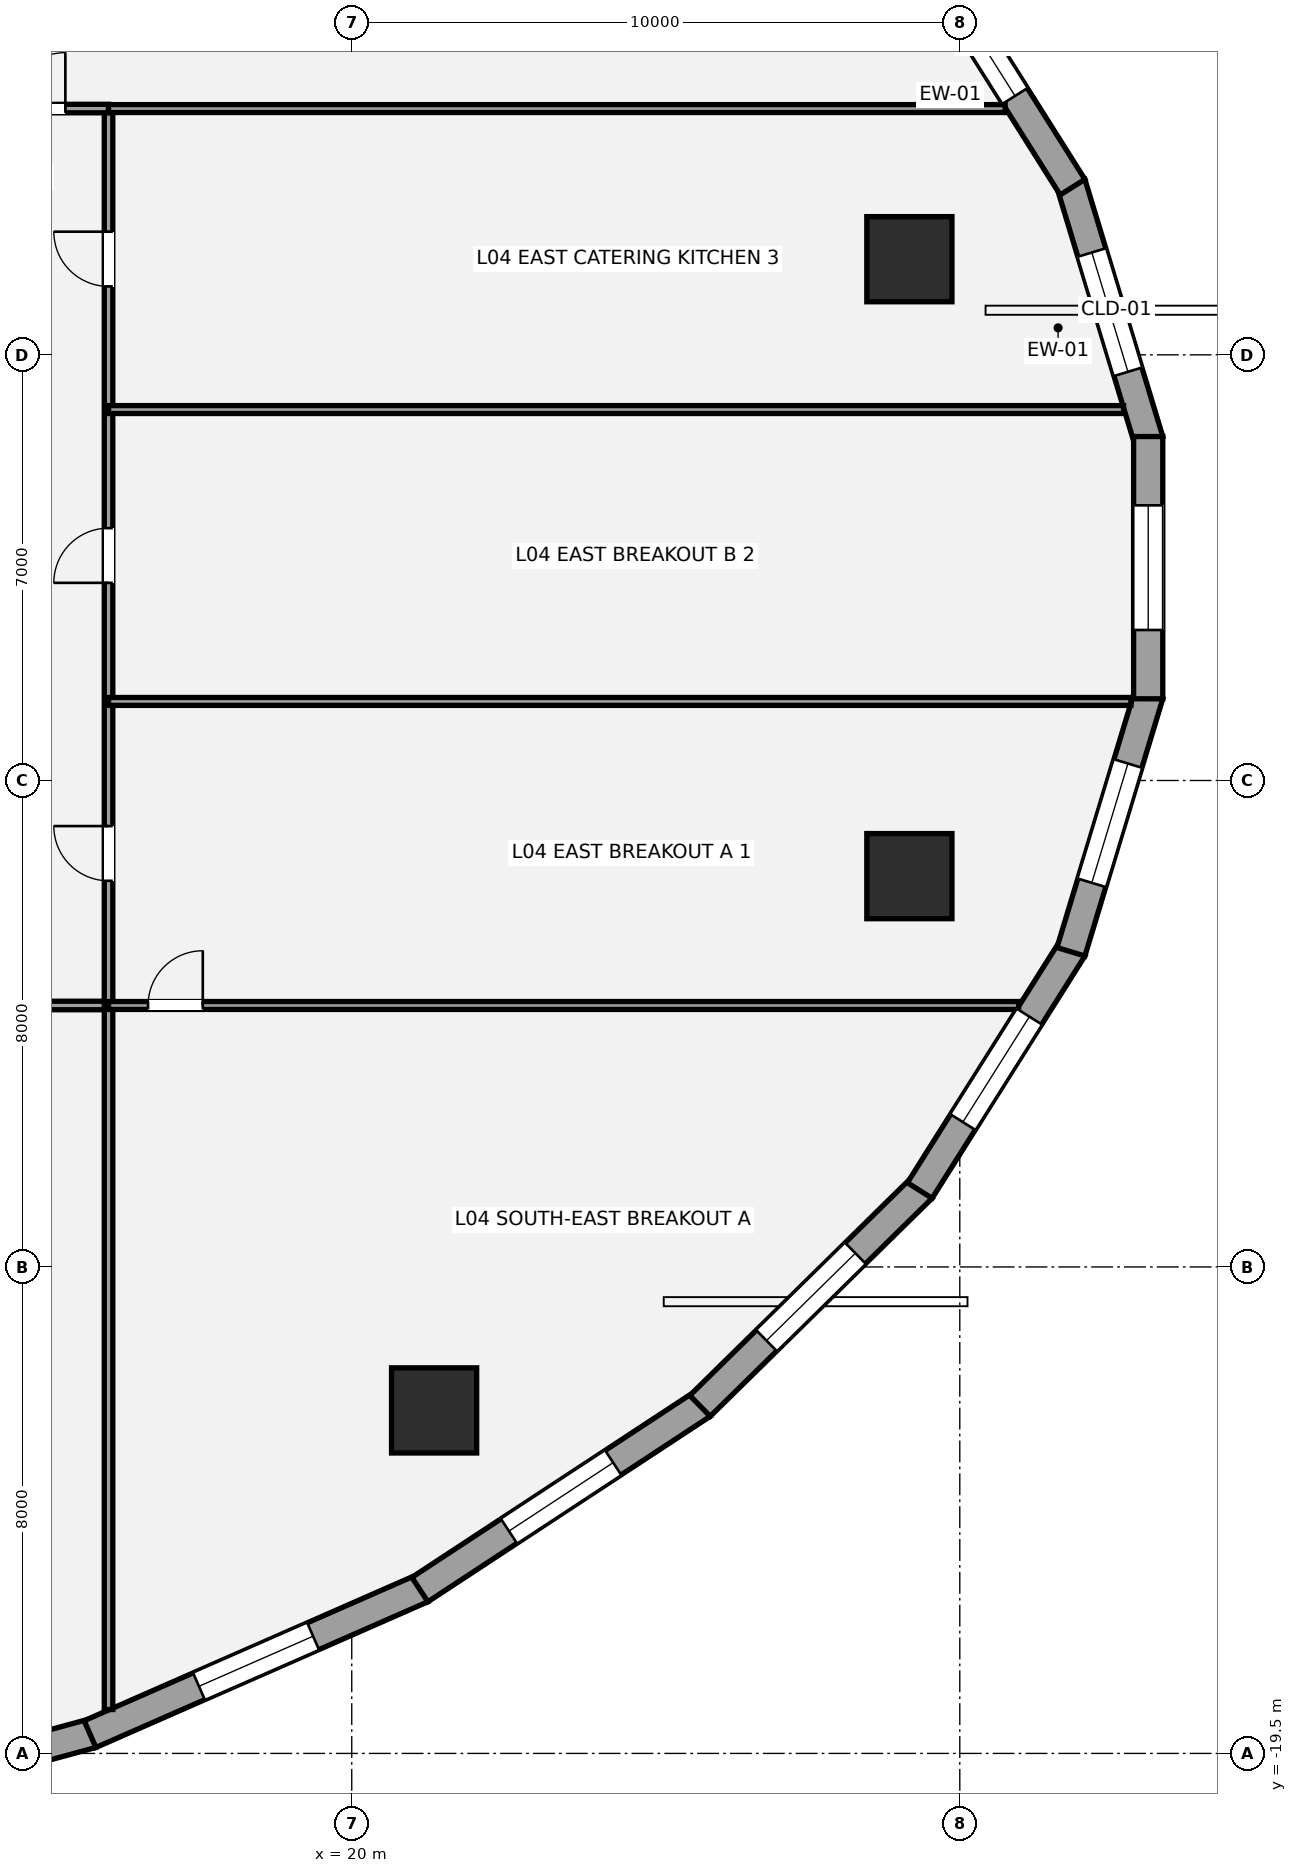
"""IFC4 building model, lengths in metres.
Left out: names, types, materials, properties, quantities, classifications, styles, units other than length and angle.
Written with IfcOpenShell. Run it as: python <this file> out.ifc"""

import sys

from ifc_helpers import new_model, si_unit, direction, frame, frame_2d, origin, origin_2d, place, context, subcontext, project, spatial, rectangle, hollow_circle, extrude, element, fill, save


model = new_model("IFC4")
c1 = context("Model", 3, precision=1e-05, world=origin(), true_north=direction((0.0, 1.0)))
c2 = subcontext(c1, "Body", "Model", "MODEL_VIEW")
j1 = project(units=[si_unit("LENGTHUNIT", "METRE"), si_unit("PLANEANGLEUNIT", "RADIAN")], contexts=[c1])
p1 = place(None, origin())
s1 = spatial("IfcSite", under=j1, at=p1, CompositionType="ELEMENT")
p2 = place(p1, origin())
s2 = spatial("IfcBuilding", under=s1, at=p2, CompositionType="ELEMENT")
p3 = place(p2, frame((0.0, 0.0, 18.6)))
s3 = spatial("IfcBuildingStorey", under=s2, at=p3, CompositionType="ELEMENT", Elevation=18.6)
for number, where, z_axis, x_axis in (
    (1, (29.171, 5.073, 0.0), (0.0, 0.0, 1.0), (1.0, 0.0, 0.0)),
    (2, (21.354, -13.859, 0.0), (0.0, 0.0, 1.0), (1.0, 0.0, 0.0)),
    (3, (29.171, -5.073, 0.0), (0.0, 0.0, 1.0), (1.0, 0.0, 0.0)),
):
    element("IfcColumn", number, at=place(p3, frame(where, z_axis=z_axis, x_axis=x_axis)), inside=s3, PredefinedType="USERDEFINED", context=c2, shape_type="SweptSolid", body=[
        extrude(hollow_circle(Radius=0.7, WallThickness=0.05, at=origin_2d()), origin(), (0.0, 0.0, 1.0), 4.2),
    ])
p4 = place(p3, frame((31.828, 6.317, 0.0), z_axis=(0.0, 0.0, 1.0), x_axis=(0.289855603468, -0.957070388811, 0.0)))
e4 = element("IfcWall", 4, at=p4, inside=s3, PredefinedType="STANDARD", context=c2, shape_type="SweptSolid", body=[
    extrude(rectangle(XDim=4.419, YDim=0.48, at=frame_2d((2.21, 0.0))), origin(), (0.0, 0.0, 1.0), 3.109),
])
p5 = place(p4, frame((1.185, 0.0, 0.72)))
e5 = element("IfcOpeningElement", 5, at=p5, cuts=e4, PredefinedType="OPENING", context=c2, shape_type="SweptSolid", body=[
    extrude(rectangle(XDim=2.05, YDim=1.8, at=frame_2d((1.025, 0.9))), frame((0.0, 0.25, 0.0), z_axis=(0.0, -1.0, 0.0), x_axis=(1.0, 0.0, 0.0)), (0.0, 0.0, 1.0), 0.5),
])
p6 = place(p3, frame((29.341, 10.243, 0.0), z_axis=(0.0, 0.0, 1.0), x_axis=(0.53349762721, -0.845801561693, 0.0)))
e6 = element("IfcWall", 6, at=p6, inside=s3, PredefinedType="STANDARD", context=c2, shape_type="SweptSolid", body=[
    extrude(rectangle(XDim=4.711, YDim=0.48, at=frame_2d((2.355, 0.0))), origin(), (0.0, 0.0, 1.0), 3.109),
])
p7 = place(p6, frame((0.888, 0.0, 0.72)))
e7 = element("IfcOpeningElement", 7, at=p7, cuts=e6, PredefinedType="OPENING", context=c2, shape_type="SweptSolid", body=[
    extrude(rectangle(XDim=2.05, YDim=1.8, at=frame_2d((1.025, 0.9))), frame((0.0, 0.25, 0.0), z_axis=(0.0, -1.0, 0.0), x_axis=(1.0, 0.0, 0.0)), (0.0, 0.0, 1.0), 0.5),
])
p8 = place(p3, frame((15.729, -19.171, 0.0), z_axis=(0.0, 0.0, 1.0), x_axis=(-0.964936550718, -0.262483243445, 0.0)))
e8 = element("IfcWall", 8, at=p8, inside=s3, PredefinedType="STANDARD", context=c2, shape_type="SweptSolid", body=[
    extrude(rectangle(XDim=6.288, YDim=0.48, at=frame_2d((3.144, 0.0))), origin(), (0.0, 0.0, 1.0), 3.109),
])
p9 = place(p8, frame((2.119, 0.0, 0.72)))
e9 = element("IfcOpeningElement", 9, at=p9, cuts=e8, PredefinedType="OPENING", context=c2, shape_type="SweptSolid", body=[
    extrude(rectangle(XDim=2.05, YDim=1.8, at=frame_2d((1.025, 0.9))), frame((0.0, 0.25, 0.0), z_axis=(0.0, -1.0, 0.0), x_axis=(1.0, 0.0, 0.0)), (0.0, 0.0, 1.0), 0.5),
])
p10 = place(p3, frame((21.156, -16.786, 0.0), z_axis=(0.0, 0.0, 1.0), x_axis=(-0.91570760638, -0.401845218484, 0.0)))
e10 = element("IfcWall", 10, at=p10, inside=s3, PredefinedType="STANDARD", context=c2, shape_type="SweptSolid", body=[
    extrude(rectangle(XDim=5.963, YDim=0.48, at=frame_2d((2.981, 0.0))), origin(), (0.0, 0.0, 1.0), 3.109),
])
p11 = place(p10, frame((1.957, 0.0, 0.72)))
e11 = element("IfcOpeningElement", 11, at=p11, cuts=e10, PredefinedType="OPENING", context=c2, shape_type="SweptSolid", body=[
    extrude(rectangle(XDim=2.05, YDim=1.8, at=frame_2d((1.025, 0.9))), frame((0.0, 0.25, 0.0), z_axis=(0.0, -1.0, 0.0), x_axis=(1.0, 0.0, 0.0)), (0.0, 0.0, 1.0), 0.5),
])
p12 = place(p3, frame((25.764, -13.756, 0.0), z_axis=(0.0, 0.0, 1.0), x_axis=(-0.835863918172, -0.548936708827, 0.0)))
e12 = element("IfcWall", 12, at=p12, inside=s3, PredefinedType="STANDARD", context=c2, shape_type="SweptSolid", body=[
    extrude(rectangle(XDim=5.555, YDim=0.48, at=frame_2d((2.778, 0.0))), origin(), (0.0, 0.0, 1.0), 3.109),
])
p13 = place(p12, frame((1.753, 0.0, 0.72)))
e13 = element("IfcOpeningElement", 13, at=p13, cuts=e12, PredefinedType="OPENING", context=c2, shape_type="SweptSolid", body=[
    extrude(rectangle(XDim=2.05, YDim=1.8, at=frame_2d((1.025, 0.9))), frame((0.0, 0.25, 0.0), z_axis=(0.0, -1.0, 0.0), x_axis=(1.0, 0.0, 0.0)), (0.0, 0.0, 1.0), 0.5),
])
p14 = place(p3, frame((29.376, -10.199, 0.0), z_axis=(0.0, 0.0, 1.0), x_axis=(-0.713189080178, -0.700971708355, 0.0)))
e14 = element("IfcWall", 14, at=p14, inside=s3, PredefinedType="STANDARD", context=c2, shape_type="SweptSolid", body=[
    extrude(rectangle(XDim=5.116, YDim=0.48, at=frame_2d((2.558, 0.0))), origin(), (0.0, 0.0, 1.0), 3.109),
])
p15 = place(p14, frame((1.533, 0.0, 0.72)))
e15 = element("IfcOpeningElement", 15, at=p15, cuts=e14, PredefinedType="OPENING", context=c2, shape_type="SweptSolid", body=[
    extrude(rectangle(XDim=2.05, YDim=1.8, at=frame_2d((1.025, 0.9))), frame((0.0, 0.25, 0.0), z_axis=(0.0, -1.0, 0.0), x_axis=(1.0, 0.0, 0.0)), (0.0, 0.0, 1.0), 0.5),
])
p16 = place(p3, frame((31.854, -6.258, 0.0), z_axis=(0.0, 0.0, 1.0), x_axis=(-0.53349762721, -0.845801561693, 0.0)))
e16 = element("IfcWall", 16, at=p16, inside=s3, PredefinedType="STANDARD", context=c2, shape_type="SweptSolid", body=[
    extrude(rectangle(XDim=4.711, YDim=0.48, at=frame_2d((2.355, 0.0))), origin(), (0.0, 0.0, 1.0), 3.109),
])
p17 = place(p16, frame((1.33, 0.0, 0.72)))
e17 = element("IfcOpeningElement", 17, at=p17, cuts=e16, PredefinedType="OPENING", context=c2, shape_type="SweptSolid", body=[
    extrude(rectangle(XDim=2.05, YDim=1.8, at=frame_2d((1.025, 0.9))), frame((0.0, 0.25, 0.0), z_axis=(0.0, -1.0, 0.0), x_axis=(1.0, 0.0, 0.0)), (0.0, 0.0, 1.0), 0.5),
])
p18 = place(p3, frame((33.109, -2.087, 0.0), z_axis=(0.0, 0.0, 1.0), x_axis=(-0.289855603468, -0.957070388811, 0.0)))
e18 = element("IfcWall", 18, at=p18, inside=s3, PredefinedType="STANDARD", context=c2, shape_type="SweptSolid", body=[
    extrude(rectangle(XDim=4.419, YDim=0.48, at=frame_2d((2.21, 0.0))), origin(), (0.0, 0.0, 1.0), 3.109),
])
p19 = place(p18, frame((1.185, 0.0, 0.72)))
e19 = element("IfcOpeningElement", 19, at=p19, cuts=e18, PredefinedType="OPENING", context=c2, shape_type="SweptSolid", body=[
    extrude(rectangle(XDim=2.05, YDim=1.8, at=frame_2d((1.025, 0.9))), frame((0.0, 0.25, 0.0), z_axis=(0.0, -1.0, 0.0), x_axis=(1.0, 0.0, 0.0)), (0.0, 0.0, 1.0), 0.5),
])
p20 = place(p3, frame((33.099, 2.156, 0.0), z_axis=(0.0, 0.0, 1.0), x_axis=(0.0, -1.0, 0.0)))
e20 = element("IfcWall", 20, at=p20, inside=s3, PredefinedType="STANDARD", context=c2, shape_type="SweptSolid", body=[
    extrude(rectangle(XDim=4.313, YDim=0.48, at=frame_2d((2.156, 0.0))), origin(), (0.0, 0.0, 1.0), 3.109),
])
p21 = place(p20, frame((1.131, 0.0, 0.72)))
e21 = element("IfcOpeningElement", 21, at=p21, cuts=e20, PredefinedType="OPENING", context=c2, shape_type="SweptSolid", body=[
    extrude(rectangle(XDim=2.05, YDim=1.8, at=frame_2d((1.025, 0.9))), frame((0.0, 0.25, 0.0), z_axis=(0.0, -1.0, 0.0), x_axis=(1.0, 0.0, 0.0)), (0.0, 0.0, 1.0), 0.5),
])
p22 = place(p3, frame((-18.6, -7.2, 0.0), z_axis=(0.0, 0.0, 1.0), x_axis=(1.0, 0.0, 0.0)))
e22 = element("IfcWall", 22, at=p22, inside=s3, PredefinedType="PARTITIONING", context=c2, shape_type="SweptSolid", body=[
    extrude(rectangle(XDim=34.6, YDim=0.14, at=frame_2d((17.3, 0.0))), origin(), (0.0, 0.0, 1.0), 3.98),
])
p23 = place(p22, frame((3.6, 0.0, 0.0)))
e23 = element("IfcOpeningElement", 23, at=p23, cuts=e22, PredefinedType="OPENING", context=c2, shape_type="SweptSolid", body=[
    extrude(rectangle(XDim=0.9, YDim=2.1, at=frame_2d((0.45, 1.05))), frame((0.0, 0.08, 0.0), z_axis=(0.0, -1.0, 0.0), x_axis=(1.0, 0.0, 0.0)), (0.0, 0.0, 1.0), 0.16),
])
p24 = place(p22, frame((12.15, 0.0, 0.0)))
e24 = element("IfcOpeningElement", 24, at=p24, cuts=e22, PredefinedType="OPENING", context=c2, shape_type="SweptSolid", body=[
    extrude(rectangle(XDim=0.9, YDim=2.1, at=frame_2d((0.45, 1.05))), frame((0.0, 0.08, 0.0), z_axis=(0.0, -1.0, 0.0), x_axis=(1.0, 0.0, 0.0)), (0.0, 0.0, 1.0), 0.16),
])
p25 = place(p22, frame((20.8, 0.0, 0.0)))
e25 = element("IfcOpeningElement", 25, at=p25, cuts=e22, PredefinedType="OPENING", context=c2, shape_type="SweptSolid", body=[
    extrude(rectangle(XDim=0.9, YDim=2.1, at=frame_2d((0.45, 1.05))), frame((0.0, 0.08, 0.0), z_axis=(0.0, -1.0, 0.0), x_axis=(1.0, 0.0, 0.0)), (0.0, 0.0, 1.0), 0.16),
])
p26 = place(p22, frame((29.55, 0.0, 0.0)))
e26 = element("IfcOpeningElement", 26, at=p26, cuts=e22, PredefinedType="OPENING", context=c2, shape_type="SweptSolid", body=[
    extrude(rectangle(XDim=0.9, YDim=2.1, at=frame_2d((0.45, 1.05))), frame((0.0, 0.08, 0.0), z_axis=(0.0, -1.0, 0.0), x_axis=(1.0, 0.0, 0.0)), (0.0, 0.0, 1.0), 0.16),
])
p27 = place(p3, frame((16.0, -18.778, 0.0), z_axis=(0.0, 0.0, 1.0), x_axis=(0.0, 1.0, 0.0)))
e27 = element("IfcWall", 27, at=p27, inside=s3, PredefinedType="PARTITIONING", context=c2, shape_type="SweptSolid", body=[
    extrude(rectangle(XDim=26.328, YDim=0.14, at=frame_2d((13.164, 0.0))), origin(), (0.0, 0.0, 1.0), 3.348),
])
p28 = place(p27, frame((13.628, 0.0, 0.0)))
e28 = element("IfcOpeningElement", 28, at=p28, cuts=e27, PredefinedType="OPENING", context=c2, shape_type="SweptSolid", body=[
    extrude(rectangle(XDim=0.9, YDim=2.1, at=frame_2d((0.45, 1.05))), frame((0.0, 0.08, 0.0), z_axis=(0.0, -1.0, 0.0), x_axis=(1.0, 0.0, 0.0)), (0.0, 0.0, 1.0), 0.16),
])
p29 = place(p27, frame((18.528, 0.0, 0.0)))
e29 = element("IfcOpeningElement", 29, at=p29, cuts=e27, PredefinedType="OPENING", context=c2, shape_type="SweptSolid", body=[
    extrude(rectangle(XDim=0.9, YDim=2.1, at=frame_2d((0.45, 1.05))), frame((0.0, 0.08, 0.0), z_axis=(0.0, -1.0, 0.0), x_axis=(1.0, 0.0, 0.0)), (0.0, 0.0, 1.0), 0.16),
])
p30 = place(p27, frame((23.403, 0.0, 0.0)))
e30 = element("IfcOpeningElement", 30, at=p30, cuts=e27, PredefinedType="OPENING", context=c2, shape_type="SweptSolid", body=[
    extrude(rectangle(XDim=0.9, YDim=2.1, at=frame_2d((0.45, 1.05))), frame((0.0, 0.08, 0.0), z_axis=(0.0, -1.0, 0.0), x_axis=(1.0, 0.0, 0.0)), (0.0, 0.0, 1.0), 0.16),
])
p31 = place(p3, frame((14.05, 7.55, 0.0), z_axis=(0.0, 0.0, 1.0), x_axis=(1.0, 0.0, 0.0)))
e31 = element("IfcWall", 31, at=p31, inside=s3, PredefinedType="PARTITIONING", context=c2, shape_type="SweptSolid", body=[
    extrude(rectangle(XDim=1.95, YDim=0.14, at=frame_2d((0.975, 0.0))), origin(), (0.0, 0.0, 1.0), 3.433),
])
p32 = place(p31, frame((0.32, 0.0, 0.0)))
e32 = element("IfcOpeningElement", 32, at=p32, cuts=e31, PredefinedType="OPENING", context=c2, shape_type="SweptSolid", body=[
    extrude(rectangle(XDim=0.92, YDim=2.15, at=frame_2d((0.46, 1.075))), frame((0.0, 0.08, 0.0), z_axis=(0.0, -1.0, 0.0), x_axis=(1.0, 0.0, 0.0)), (0.0, 0.0, 1.0), 0.16),
])
p33 = place(p3, frame((16.0, 7.55, 0.0), z_axis=(0.0, 0.0, 1.0), x_axis=(1.0, 0.0, 0.0)))
e33 = element("IfcWall", 33, at=p33, inside=s3, PredefinedType="PARTITIONING", context=c2, shape_type="SweptSolid", body=[
    extrude(rectangle(XDim=14.747, YDim=0.13, at=frame_2d((7.373, 0.0))), origin(), (0.0, 0.0, 1.0), 2.958),
])
p34 = place(p3, frame((16.0, -7.2, 0.0), z_axis=(0.0, 0.0, 1.0), x_axis=(1.0, 0.0, 0.0)))
e34 = element("IfcWall", 34, at=p34, inside=s3, PredefinedType="PARTITIONING", context=c2, shape_type="SweptSolid", body=[
    extrude(rectangle(XDim=14.967, YDim=0.13, at=frame_2d((7.484, 0.0))), origin(), (0.0, 0.0, 1.0), 2.958),
])
p35 = place(p34, frame((0.65, 0.0, 0.0)))
e35 = element("IfcOpeningElement", 35, at=p35, cuts=e34, PredefinedType="OPENING", context=c2, shape_type="SweptSolid", body=[
    extrude(rectangle(XDim=0.9, YDim=2.1, at=frame_2d((0.45, 1.05))), frame((0.0, 0.075, 0.0), z_axis=(0.0, -1.0, 0.0), x_axis=(1.0, 0.0, 0.0)), (0.0, 0.0, 1.0), 0.15),
])
p36 = place(p3, frame((16.0, -2.2, 0.0), z_axis=(0.0, 0.0, 1.0), x_axis=(1.0, 0.0, 0.0)))
e36 = element("IfcWall", 36, at=p36, inside=s3, PredefinedType="PARTITIONING", context=c2, shape_type="SweptSolid", body=[
    extrude(rectangle(XDim=16.816, YDim=0.13, at=frame_2d((8.408, 0.0))), origin(), (0.0, 0.0, 1.0), 3.348),
])
p37 = place(p3, frame((16.0, 2.6, 0.0), z_axis=(0.0, 0.0, 1.0), x_axis=(1.0, 0.0, 0.0)))
e37 = element("IfcWall", 37, at=p37, inside=s3, PredefinedType="PARTITIONING", context=c2, shape_type="SweptSolid", body=[
    extrude(rectangle(XDim=16.694, YDim=0.13, at=frame_2d((8.347, 0.0))), origin(), (0.0, 0.0, 1.0), 3.348),
])
p38 = place(p5, origin())
e38 = element("IfcWindow", 38, at=p38, inside=s3, PartitioningType="SINGLE_PANEL", PredefinedType="WINDOW", context=c2, shape_type="SweptSolid", body=[
    extrude(rectangle(XDim=2.05, YDim=1.8, at=frame_2d((1.025, 0.9))), frame((0.0, -0.01, 0.0), z_axis=(0.0, -1.0, 0.0), x_axis=(1.0, 0.0, 0.0)), (0.0, 0.0, 1.0), 0.06),
])
fill(e5, e38)
p39 = place(p7, origin())
e39 = element("IfcWindow", 39, at=p39, inside=s3, PartitioningType="SINGLE_PANEL", PredefinedType="WINDOW", context=c2, shape_type="SweptSolid", body=[
    extrude(rectangle(XDim=2.05, YDim=1.8, at=frame_2d((1.025, 0.9))), frame((0.0, -0.01, 0.0), z_axis=(0.0, -1.0, 0.0), x_axis=(1.0, 0.0, 0.0)), (0.0, 0.0, 1.0), 0.06),
])
fill(e7, e39)
p40 = place(p11, origin())
e40 = element("IfcWindow", 40, at=p40, inside=s3, PartitioningType="SINGLE_PANEL", PredefinedType="WINDOW", context=c2, shape_type="SweptSolid", body=[
    extrude(rectangle(XDim=2.05, YDim=1.8, at=frame_2d((1.025, 0.9))), frame((0.0, -0.01, 0.0), z_axis=(0.0, -1.0, 0.0), x_axis=(1.0, 0.0, 0.0)), (0.0, 0.0, 1.0), 0.06),
])
fill(e11, e40)
p41 = place(p13, origin())
e41 = element("IfcWindow", 41, at=p41, inside=s3, PartitioningType="SINGLE_PANEL", PredefinedType="WINDOW", context=c2, shape_type="SweptSolid", body=[
    extrude(rectangle(XDim=2.05, YDim=1.8, at=frame_2d((1.025, 0.9))), frame((0.0, -0.01, 0.0), z_axis=(0.0, -1.0, 0.0), x_axis=(1.0, 0.0, 0.0)), (0.0, 0.0, 1.0), 0.06),
])
fill(e13, e41)
p42 = place(p15, origin())
e42 = element("IfcWindow", 42, at=p42, inside=s3, PartitioningType="SINGLE_PANEL", PredefinedType="WINDOW", context=c2, shape_type="SweptSolid", body=[
    extrude(rectangle(XDim=2.05, YDim=1.8, at=frame_2d((1.025, 0.9))), frame((0.0, -0.01, 0.0), z_axis=(0.0, -1.0, 0.0), x_axis=(1.0, 0.0, 0.0)), (0.0, 0.0, 1.0), 0.06),
])
fill(e15, e42)
p43 = place(p17, origin())
e43 = element("IfcWindow", 43, at=p43, inside=s3, PartitioningType="SINGLE_PANEL", PredefinedType="WINDOW", context=c2, shape_type="SweptSolid", body=[
    extrude(rectangle(XDim=2.05, YDim=1.8, at=frame_2d((1.025, 0.9))), frame((0.0, -0.01, 0.0), z_axis=(0.0, -1.0, 0.0), x_axis=(1.0, 0.0, 0.0)), (0.0, 0.0, 1.0), 0.06),
])
fill(e17, e43)
p44 = place(p19, origin())
e44 = element("IfcWindow", 44, at=p44, inside=s3, PartitioningType="SINGLE_PANEL", PredefinedType="WINDOW", context=c2, shape_type="SweptSolid", body=[
    extrude(rectangle(XDim=2.05, YDim=1.8, at=frame_2d((1.025, 0.9))), frame((0.0, -0.01, 0.0), z_axis=(0.0, -1.0, 0.0), x_axis=(1.0, 0.0, 0.0)), (0.0, 0.0, 1.0), 0.06),
])
fill(e19, e44)
p45 = place(p21, origin())
e45 = element("IfcWindow", 45, at=p45, inside=s3, PartitioningType="SINGLE_PANEL", PredefinedType="WINDOW", context=c2, shape_type="SweptSolid", body=[
    extrude(rectangle(XDim=2.05, YDim=1.8, at=frame_2d((1.025, 0.9))), frame((0.0, -0.01, 0.0), z_axis=(0.0, -1.0, 0.0), x_axis=(1.0, 0.0, 0.0)), (0.0, 0.0, 1.0), 0.06),
])
fill(e21, e45)
p46 = place(p32, origin())
e46 = element("IfcDoor", 46, at=p46, inside=s3, OperationType="SINGLE_SWING_RIGHT", PredefinedType="DOOR", context=c2, shape_type="SweptSolid", body=[
    extrude(rectangle(XDim=0.92, YDim=2.15, at=frame_2d((0.46, 1.075))), frame((0.0, 0.025, 0.0), z_axis=(0.0, -1.0, 0.0), x_axis=(1.0, 0.0, 0.0)), (0.0, 0.0, 1.0), 0.05),
])
fill(e32, e46)
p47 = place(p35, origin())
e47 = element("IfcDoor", 47, at=p47, inside=s3, OperationType="SINGLE_SWING_RIGHT", PredefinedType="DOOR", context=c2, shape_type="SweptSolid", body=[
    extrude(rectangle(XDim=0.9, YDim=2.1, at=frame_2d((0.45, 1.05))), frame((0.0, 0.025, 0.0), z_axis=(0.0, -1.0, 0.0), x_axis=(1.0, 0.0, 0.0)), (0.0, 0.0, 1.0), 0.05),
])
fill(e35, e47)
p48 = place(p28, origin())
e48 = element("IfcDoor", 48, at=p48, inside=s3, OperationType="SINGLE_SWING_RIGHT", PredefinedType="DOOR", context=c2, shape_type="SweptSolid", body=[
    extrude(rectangle(XDim=0.9, YDim=2.1, at=frame_2d((0.45, 1.05))), frame((0.0, 0.025, 0.0), z_axis=(0.0, -1.0, 0.0), x_axis=(1.0, 0.0, 0.0)), (0.0, 0.0, 1.0), 0.05),
])
fill(e28, e48)
p49 = place(p29, origin())
e49 = element("IfcDoor", 49, at=p49, inside=s3, OperationType="SINGLE_SWING_LEFT", PredefinedType="DOOR", context=c2, shape_type="SweptSolid", body=[
    extrude(rectangle(XDim=0.9, YDim=2.1, at=frame_2d((0.45, 1.05))), frame((0.0, 0.025, 0.0), z_axis=(0.0, -1.0, 0.0), x_axis=(1.0, 0.0, 0.0)), (0.0, 0.0, 1.0), 0.05),
])
fill(e29, e49)
p50 = place(p30, origin())
e50 = element("IfcDoor", 50, at=p50, inside=s3, OperationType="SINGLE_SWING_RIGHT", PredefinedType="DOOR", context=c2, shape_type="SweptSolid", body=[
    extrude(rectangle(XDim=0.9, YDim=2.1, at=frame_2d((0.45, 1.05))), frame((0.0, 0.025, 0.0), z_axis=(0.0, -1.0, 0.0), x_axis=(1.0, 0.0, 0.0)), (0.0, 0.0, 1.0), 0.05),
])
fill(e30, e50)
save(model, sys.argv[1])
